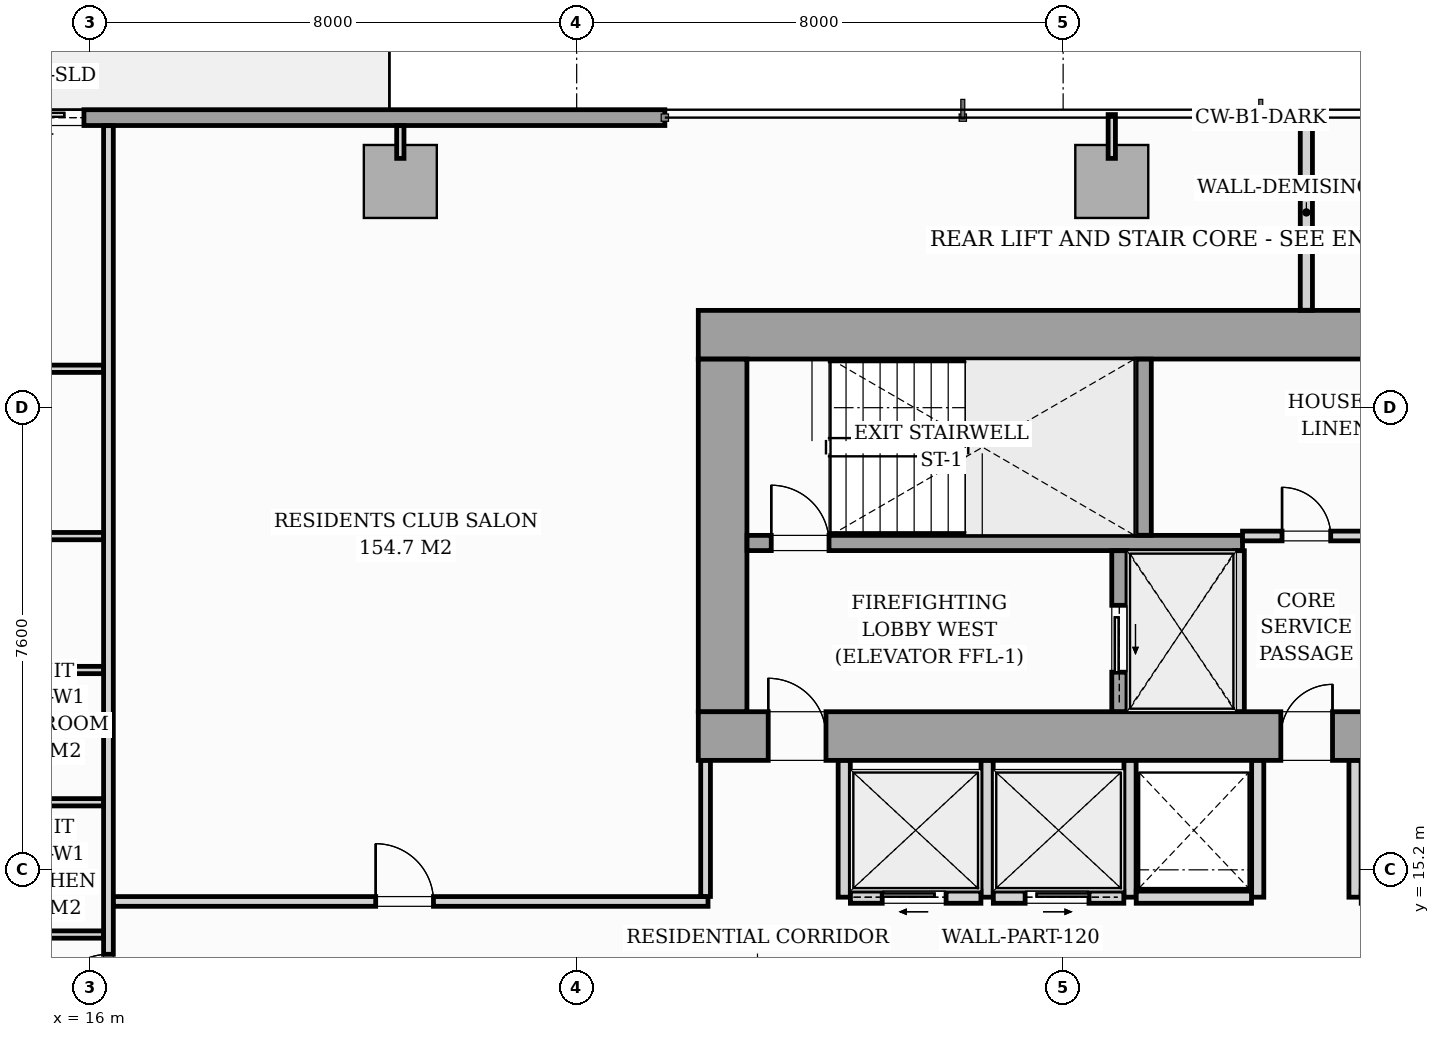
"""IFC4 building model, lengths in metres.
Left out: names, types, materials, properties, quantities, classifications, styles, units other than length and angle.
Written with IfcOpenShell. Run it as: python <this file> out.ifc"""

import sys

from ifc_helpers import new_model, si_unit, direction, frame, frame_2d, origin, origin_2d, place, context, subcontext, project, spatial, rectangle, i_section, extrude, source, transform, mapped, element, fill, save


model = new_model("IFC4")
c1 = context("Model", 3, precision=1e-05, world=origin(), true_north=direction((0.0, 1.0)))
c2 = subcontext(c1, "Body", "Model", "MODEL_VIEW")
j1 = project(units=[si_unit("LENGTHUNIT", "METRE"), si_unit("PLANEANGLEUNIT", "RADIAN")], contexts=[c1])
p1 = place(None, origin())
s1 = spatial("IfcSite", under=j1, at=p1, CompositionType="ELEMENT")
p2 = place(p1, origin())
s2 = spatial("IfcBuilding", under=s1, at=p2, CompositionType="ELEMENT")
p3 = place(p2, frame((0.0, 0.0, 51.8)))
s3 = spatial("IfcBuildingStorey", under=s2, at=p3, CompositionType="ELEMENT", Elevation=51.8)
m1 = source(origin(), c2, "Body", "SweptSolid", [
    extrude(i_section(OverallWidth=0.437, OverallDepth=0.514, WebThickness=0.061, FlangeThickness=0.097, FilletRadius=0.018, at=origin_2d()), origin(), (0.0, 0.0, 1.0), 3.196),
])
for number, where, z_axis, x_axis in (
    (1, (26.4, 17.4, 0.002), (0.0, 0.0, 1.0), (1.0, 0.0, 0.0)),
    (2, (33.12, 17.4, 0.002), (0.0, 0.0, 1.0), (1.0, 0.0, 0.0)),
    (3, (26.4, 24.0, 0.002), (0.0, 0.0, 1.0), (1.0, 0.0, 0.0)),
    (4, (33.12, 24.0, 0.002), (0.0, 0.0, 1.0), (1.0, 0.0, 0.0)),
):
    element("IfcColumn", number, at=place(p3, frame(where, z_axis=z_axis, x_axis=x_axis)), inside=s3, PredefinedType="PILASTER", context=c2, shape_type="MappedRepresentation", body=[
        mapped(m1, transform((0.0, 0.0, 0.0), scale=1.0)),
    ])
m2 = source(origin(), c2, "Body", "SweptSolid", [
    extrude(rectangle(XDim=1.2, YDim=1.2, at=origin_2d()), origin(), (0.0, 0.0, 1.0), 3.196),
])
for number, where, z_axis, x_axis in (
    (5, (21.1, 26.52, 0.002), (0.0, 0.0, 1.0), (1.0, 0.0, 0.0)),
    (6, (32.8, 26.52, 0.002), (0.0, 0.0, 1.0), (1.0, 0.0, 0.0)),
):
    element("IfcColumn", number, at=place(p3, frame(where, z_axis=z_axis, x_axis=x_axis)), inside=s3, PredefinedType="COLUMN", context=c2, shape_type="MappedRepresentation", body=[
        mapped(m2, transform((0.0, 0.0, 0.0), scale=1.0)),
    ])
p4 = place(p3, frame((8.3, 27.57, 0.0), z_axis=(0.0, 0.0, 1.0), x_axis=(1.0, 0.0, 0.0)))
e7 = element("IfcWall", 7, at=p4, inside=s3, PredefinedType="STANDARD", context=c2, shape_type="SweptSolid", body=[
    extrude(rectangle(XDim=17.15, YDim=0.26, at=frame_2d((8.575, 0.0))), origin(), (0.0, 0.0, 1.0), 2.94),
])
p5 = place(p4, frame((5.797, 0.0, 0.0)))
e8 = element("IfcOpeningElement", 8, at=p5, cuts=e7, PredefinedType="OPENING", context=c2, shape_type="SweptSolid", body=[
    extrude(rectangle(XDim=1.8, YDim=2.06, at=frame_2d((0.9, 1.03))), frame((0.0, 0.14, 0.0), z_axis=(0.0, -1.0, 0.0), x_axis=(1.0, 0.0, 0.0)), (0.0, 0.0, 1.0), 0.28),
])
p6 = place(p4, frame((2.05, 0.0, 0.65)))
e9 = element("IfcOpeningElement", 9, at=p6, cuts=e7, PredefinedType="OPENING", context=c2, shape_type="SweptSolid", body=[
    extrude(rectangle(XDim=1.6, YDim=1.5, at=frame_2d((0.8, 0.75))), frame((0.0, 0.14, 0.0), z_axis=(0.0, -1.0, 0.0), x_axis=(1.0, 0.0, 0.0)), (0.0, 0.0, 1.0), 0.28),
])
p7 = place(p3, frame((26.0, 17.4, 0.0), z_axis=(0.0, 0.0, 1.0), x_axis=(1.0, 0.0, 0.0)))
e10 = element("IfcWall", 10, at=p7, inside=s3, PredefinedType="SHEAR", context=c2, shape_type="SweptSolid", body=[
    extrude(rectangle(XDim=20.0, YDim=0.8, at=frame_2d((10.0, 0.0))), origin(), (0.0, 0.0, 1.0), 3.2),
])
p8 = place(p7, frame((1.15, 0.0, 0.0)))
e11 = element("IfcOpeningElement", 11, at=p8, cuts=e10, PredefinedType="OPENING", context=c2, shape_type="SweptSolid", body=[
    extrude(rectangle(XDim=0.95, YDim=2.06, at=frame_2d((0.475, 1.03))), frame((0.0, 0.41, 0.0), z_axis=(0.0, -1.0, 0.0), x_axis=(1.0, 0.0, 0.0)), (0.0, 0.0, 1.0), 0.82),
])
p9 = place(p7, frame((9.58, 0.0, 0.0)))
e12 = element("IfcOpeningElement", 12, at=p9, cuts=e10, PredefinedType="OPENING", context=c2, shape_type="SweptSolid", body=[
    extrude(rectangle(XDim=0.85, YDim=2.0, at=frame_2d((0.425, 1.0))), frame((0.0, 0.41, 0.0), z_axis=(0.0, -1.0, 0.0), x_axis=(1.0, 0.0, 0.0)), (0.0, 0.0, 1.0), 0.82),
])
p10 = place(p7, frame((17.75, 0.0, 0.0)))
e13 = element("IfcOpeningElement", 13, at=p10, cuts=e10, PredefinedType="OPENING", context=c2, shape_type="SweptSolid", body=[
    extrude(rectangle(XDim=0.95, YDim=2.06, at=frame_2d((0.475, 1.03))), frame((0.0, 0.41, 0.0), z_axis=(0.0, -1.0, 0.0), x_axis=(1.0, 0.0, 0.0)), (0.0, 0.0, 1.0), 0.82),
])
p11 = place(p3, frame((26.0, 24.0, 0.0), z_axis=(0.0, 0.0, 1.0), x_axis=(1.0, 0.0, 0.0)))
e14 = element("IfcWall", 14, at=p11, inside=s3, PredefinedType="SHEAR", context=c2, shape_type="SweptSolid", body=[
    extrude(rectangle(XDim=20.0, YDim=0.8, at=frame_2d((10.0, 0.0))), origin(), (0.0, 0.0, 1.0), 3.2),
])
p12 = place(p3, frame((26.4, 17.802, 0.0), z_axis=(0.0, 0.0, 1.0), x_axis=(0.0, 1.0, 0.0)))
e15 = element("IfcWall", 15, at=p12, inside=s3, PredefinedType="SHEAR", context=c2, shape_type="SweptSolid", body=[
    extrude(rectangle(XDim=5.796, YDim=0.8, at=frame_2d((2.898, 0.0))), origin(), (0.0, 0.0, 1.0), 3.2),
])
p13 = place(p3, frame((26.802, 20.575, 0.0), z_axis=(0.0, 0.0, 1.0), x_axis=(1.0, 0.0, 0.0)))
e16 = element("IfcWall", 16, at=p13, inside=s3, PredefinedType="SOLIDWALL", context=c2, shape_type="SweptSolid", body=[
    extrude(rectangle(XDim=8.148, YDim=0.25, at=frame_2d((4.074, 0.0))), origin(), (0.0, 0.0, 1.0), 3.2),
])
p14 = place(p13, frame((0.398, 0.0, 0.0)))
e17 = element("IfcOpeningElement", 17, at=p14, cuts=e16, PredefinedType="OPENING", context=c2, shape_type="SweptSolid", body=[
    extrude(rectangle(XDim=0.95, YDim=2.06, at=frame_2d((0.475, 1.03))), frame((0.0, 0.135, 0.0), z_axis=(0.0, -1.0, 0.0), x_axis=(1.0, 0.0, 0.0)), (0.0, 0.0, 1.0), 0.27),
])
p15 = place(p3, frame((33.325, 20.702, 0.0), z_axis=(0.0, 0.0, 1.0), x_axis=(0.0, 1.0, 0.0)))
e18 = element("IfcWall", 18, at=p15, inside=s3, PredefinedType="SOLIDWALL", context=c2, shape_type="SweptSolid", body=[
    extrude(rectangle(XDim=2.896, YDim=0.25, at=frame_2d((1.448, 0.0))), origin(), (0.0, 0.0, 1.0), 3.2),
])
p16 = place(p3, frame((32.925, 17.802, 0.0), z_axis=(0.0, 0.0, 1.0), x_axis=(0.0, 1.0, 0.0)))
e19 = element("IfcWall", 19, at=p16, inside=s3, PredefinedType="SOLIDWALL", context=c2, shape_type="SweptSolid", body=[
    extrude(rectangle(XDim=2.646, YDim=0.25, at=frame_2d((1.323, 0.0))), origin(), (0.0, 0.0, 1.0), 3.2),
])
p17 = place(p16, frame((0.648, 0.0, 0.0)))
e20 = element("IfcOpeningElement", 20, at=p17, cuts=e19, PredefinedType="OPENING", context=c2, shape_type="SweptSolid", body=[
    extrude(rectangle(XDim=1.1, YDim=2.08, at=frame_2d((0.55, 1.04))), frame((0.0, 0.135, 0.0), z_axis=(0.0, -1.0, 0.0), x_axis=(1.0, 0.0, 0.0)), (0.0, 0.0, 1.0), 0.27),
])
p18 = place(p3, frame((34.9, 17.802, 0.0), z_axis=(0.0, 0.0, 1.0), x_axis=(0.0, 1.0, 0.0)))
e21 = element("IfcWall", 21, at=p18, inside=s3, PredefinedType="PARTITIONING", context=c2, shape_type="SweptSolid", body=[
    extrude(rectangle(XDim=2.646, YDim=0.16, at=frame_2d((1.323, 0.0))), origin(), (0.0, 0.0, 1.0), 2.94),
])
p19 = place(p3, frame((34.95, 20.69, 0.0), z_axis=(0.0, 0.0, 1.0), x_axis=(1.0, 0.0, 0.0)))
e22 = element("IfcWall", 22, at=p19, inside=s3, PredefinedType="PARTITIONING", context=c2, shape_type="SweptSolid", body=[
    extrude(rectangle(XDim=2.1, YDim=0.16, at=frame_2d((1.05, 0.0))), origin(), (0.0, 0.0, 1.0), 2.94),
])
p20 = place(p19, frame((0.65, 0.0, 0.0)))
e23 = element("IfcOpeningElement", 23, at=p20, cuts=e22, PredefinedType="OPENING", context=c2, shape_type="SweptSolid", body=[
    extrude(rectangle(XDim=0.8, YDim=2.05, at=frame_2d((0.4, 1.025))), frame((0.0, 0.09, 0.0), z_axis=(0.0, -1.0, 0.0), x_axis=(1.0, 0.0, 0.0)), (0.0, 0.0, 1.0), 0.18),
])
for number, where, z_axis, x_axis in (
    (24, (28.4, 14.75, 0.0), (0.0, 0.0, 1.0), (0.0, 1.0, 0.0)),
    (25, (30.75, 14.75, 0.0), (0.0, 0.0, 1.0), (0.0, 1.0, 0.0)),
    (26, (33.1, 14.75, 0.0), (0.0, 0.0, 1.0), (0.0, 1.0, 0.0)),
):
    element("IfcWall", number, at=place(p3, frame(where, z_axis=z_axis, x_axis=x_axis)), inside=s3, PredefinedType="PARTITIONING", context=c2, shape_type="SweptSolid", body=[
        extrude(rectangle(XDim=2.248, YDim=0.2, at=frame_2d((1.124, 0.0))), origin(), (0.0, 0.0, 1.0), 2.94),
    ])
p21 = place(p3, frame((28.502, 14.75, 0.0), z_axis=(0.0, 0.0, 1.0), x_axis=(1.0, 0.0, 0.0)))
e27 = element("IfcWall", 27, at=p21, inside=s3, PredefinedType="PARTITIONING", context=c2, shape_type="SweptSolid", body=[
    extrude(rectangle(XDim=2.146, YDim=0.2, at=frame_2d((1.073, 0.0))), origin(), (0.0, 0.0, 1.0), 2.94),
])
p22 = place(p21, frame((0.523, 0.0, 0.0)))
e28 = element("IfcOpeningElement", 28, at=p22, cuts=e27, PredefinedType="OPENING", context=c2, shape_type="SweptSolid", body=[
    extrude(rectangle(XDim=1.05, YDim=2.08, at=frame_2d((0.525, 1.04))), frame((0.0, 0.11, 0.0), z_axis=(0.0, -1.0, 0.0), x_axis=(1.0, 0.0, 0.0)), (0.0, 0.0, 1.0), 0.22),
])
p23 = place(p3, frame((30.852, 14.75, 0.0), z_axis=(0.0, 0.0, 1.0), x_axis=(1.0, 0.0, 0.0)))
e29 = element("IfcWall", 29, at=p23, inside=s3, PredefinedType="PARTITIONING", context=c2, shape_type="SweptSolid", body=[
    extrude(rectangle(XDim=2.146, YDim=0.2, at=frame_2d((1.073, 0.0))), origin(), (0.0, 0.0, 1.0), 2.94),
])
p24 = place(p23, frame((0.523, 0.0, 0.0)))
e30 = element("IfcOpeningElement", 30, at=p24, cuts=e29, PredefinedType="OPENING", context=c2, shape_type="SweptSolid", body=[
    extrude(rectangle(XDim=1.05, YDim=2.08, at=frame_2d((0.525, 1.04))), frame((0.0, 0.11, 0.0), z_axis=(0.0, -1.0, 0.0), x_axis=(1.0, 0.0, 0.0)), (0.0, 0.0, 1.0), 0.22),
])
p25 = place(p3, frame((35.2, 14.75, 0.0), z_axis=(0.0, 0.0, 1.0), x_axis=(0.0, 1.0, 0.0)))
e31 = element("IfcWall", 31, at=p25, inside=s3, PredefinedType="PARTITIONING", context=c2, shape_type="SweptSolid", body=[
    extrude(rectangle(XDim=2.248, YDim=0.2, at=frame_2d((1.124, 0.0))), origin(), (0.0, 0.0, 1.0), 2.94),
])
p26 = place(p3, frame((33.202, 14.75, 0.0), z_axis=(0.0, 0.0, 1.0), x_axis=(1.0, 0.0, 0.0)))
e32 = element("IfcWall", 32, at=p26, inside=s3, PredefinedType="PARTITIONING", context=c2, shape_type="SweptSolid", body=[
    extrude(rectangle(XDim=1.896, YDim=0.2, at=frame_2d((0.948, 0.0))), origin(), (0.0, 0.0, 1.0), 2.94),
])
p27 = place(p3, frame((36.8, 14.75, 0.0), z_axis=(0.0, 0.0, 1.0), x_axis=(0.0, 1.0, 0.0)))
e33 = element("IfcWall", 33, at=p27, inside=s3, PredefinedType="PARTITIONING", context=c2, shape_type="SweptSolid", body=[
    extrude(rectangle(XDim=2.248, YDim=0.2, at=frame_2d((1.124, 0.0))), origin(), (0.0, 0.0, 1.0), 2.94),
])
p28 = place(p3, frame((16.3, 12.432, 0.0), z_axis=(0.0, 0.0, 1.0), x_axis=(0.0, 1.0, 0.0)))
e34 = element("IfcWall", 34, at=p28, inside=s3, PredefinedType="PARTITIONING", context=c2, shape_type="SweptSolid", body=[
    extrude(rectangle(XDim=15.006, YDim=0.16, at=frame_2d((7.503, 0.0))), origin(), (0.0, 0.0, 1.0), 2.94),
])
p29 = place(p28, frame((0.429, 0.0, 0.0)))
e35 = element("IfcOpeningElement", 35, at=p29, cuts=e34, PredefinedType="OPENING", context=c2, shape_type="SweptSolid", body=[
    extrude(rectangle(XDim=0.95, YDim=2.06, at=frame_2d((0.475, 1.03))), frame((0.0, 0.09, 0.0), z_axis=(0.0, -1.0, 0.0), x_axis=(1.0, 0.0, 0.0)), (0.0, 0.0, 1.0), 0.18),
])
p30 = place(p3, frame((36.0, 24.402, 0.0), z_axis=(0.0, 0.0, 1.0), x_axis=(0.0, 1.0, 0.0)))
e36 = element("IfcWall", 36, at=p30, inside=s3, PredefinedType="PARTITIONING", context=c2, shape_type="SweptSolid", body=[
    extrude(rectangle(XDim=3.218, YDim=0.2, at=frame_2d((1.609, 0.0))), origin(), (0.0, 0.0, 1.0), 2.94),
])
p31 = place(p3, frame((13.962, 16.311, 0.0), z_axis=(0.0, 0.0, 1.0), x_axis=(1.0, 0.0, 0.0)))
e37 = element("IfcWall", 37, at=p31, inside=s3, PredefinedType="PARTITIONING", context=c2, shape_type="SweptSolid", body=[
    extrude(rectangle(XDim=2.256, YDim=0.12, at=frame_2d((1.128, 0.0))), origin(), (0.0, 0.0, 1.0), 2.045),
])
for number, where, z_axis, x_axis in (
    (38, (13.962, 14.136, 0.0), (0.0, 0.0, 1.0), (1.0, 0.0, 0.0)),
    (39, (13.962, 18.486, 0.0), (0.0, 0.0, 1.0), (1.0, 0.0, 0.0)),
):
    element("IfcWall", number, at=place(p3, frame(where, z_axis=z_axis, x_axis=x_axis)), inside=s3, PredefinedType="PARTITIONING", context=c2, shape_type="SweptSolid", body=[
        extrude(rectangle(XDim=2.256, YDim=0.12, at=frame_2d((1.128, 0.0))), origin(), (0.0, 0.0, 1.0), 2.94),
    ])
p32 = place(p3, frame((5.88, 23.44, 0.0), z_axis=(0.0, 0.0, 1.0), x_axis=(1.0, 0.0, 0.0)))
e40 = element("IfcWall", 40, at=p32, inside=s3, PredefinedType="PARTITIONING", context=c2, shape_type="SweptSolid", body=[
    extrude(rectangle(XDim=10.338, YDim=0.12, at=frame_2d((5.169, 0.0))), origin(), (0.0, 0.0, 1.0), 2.94),
])
p33 = place(p32, frame((4.735, 0.0, 0.0)))
e41 = element("IfcOpeningElement", 41, at=p33, cuts=e40, PredefinedType="OPENING", context=c2, shape_type="SweptSolid", body=[
    extrude(rectangle(XDim=0.85, YDim=2.05, at=frame_2d((0.425, 1.025))), frame((0.0, 0.07, 0.0), z_axis=(0.0, -1.0, 0.0), x_axis=(1.0, 0.0, 0.0)), (0.0, 0.0, 1.0), 0.14),
])
p34 = place(p3, frame((5.88, 20.688, 0.0), z_axis=(0.0, 0.0, 1.0), x_axis=(1.0, 0.0, 0.0)))
e42 = element("IfcWall", 42, at=p34, inside=s3, PredefinedType="PARTITIONING", context=c2, shape_type="SweptSolid", body=[
    extrude(rectangle(XDim=10.338, YDim=0.12, at=frame_2d((5.169, 0.0))), origin(), (0.0, 0.0, 1.0), 2.94),
])
p35 = place(p34, frame((4.735, 0.0, 0.0)))
e43 = element("IfcOpeningElement", 43, at=p35, cuts=e42, PredefinedType="OPENING", context=c2, shape_type="SweptSolid", body=[
    extrude(rectangle(XDim=0.85, YDim=2.05, at=frame_2d((0.425, 1.025))), frame((0.0, 0.07, 0.0), z_axis=(0.0, -1.0, 0.0), x_axis=(1.0, 0.0, 0.0)), (0.0, 0.0, 1.0), 0.14),
])
p36 = place(p3, frame((16.382, 14.68, 0.0), z_axis=(0.0, 0.0, 1.0), x_axis=(1.0, 0.0, 0.0)))
e44 = element("IfcWall", 44, at=p36, inside=s3, PredefinedType="PARTITIONING", context=c2, shape_type="SweptSolid", body=[
    extrude(rectangle(XDim=9.778, YDim=0.16, at=frame_2d((4.889, 0.0))), origin(), (0.0, 0.0, 1.0), 2.94),
])
p37 = place(p36, frame((4.313, 0.0, 0.0)))
e45 = element("IfcOpeningElement", 45, at=p37, cuts=e44, PredefinedType="OPENING", context=c2, shape_type="SweptSolid", body=[
    extrude(rectangle(XDim=0.95, YDim=2.06, at=frame_2d((0.475, 1.03))), frame((0.0, 0.09, 0.0), z_axis=(0.0, -1.0, 0.0), x_axis=(1.0, 0.0, 0.0)), (0.0, 0.0, 1.0), 0.18),
])
p38 = place(p3, frame((26.12, 14.762, 0.0), z_axis=(0.0, 0.0, 1.0), x_axis=(0.0, 1.0, 0.0)))
e46 = element("IfcWall", 46, at=p38, inside=s3, PredefinedType="PARTITIONING", context=c2, shape_type="SweptSolid", body=[
    extrude(rectangle(XDim=2.236, YDim=0.16, at=frame_2d((1.118, 0.0))), origin(), (0.0, 0.0, 1.0), 2.94),
])
p39 = place(p3, frame((21.1, 26.9, 0.0), z_axis=(0.0, 0.0, 1.0), x_axis=(0.0, 1.0, 0.0)))
e47 = element("IfcWall", 47, at=p39, inside=s3, PredefinedType="PARTITIONING", context=c2, shape_type="SweptSolid", body=[
    extrude(rectangle(XDim=0.538, YDim=0.12, at=frame_2d((0.269, 0.0))), origin(), (0.0, 0.0, 1.0), 2.94),
])
p40 = place(p3, frame((32.8, 26.9, 0.0), z_axis=(0.0, 0.0, 1.0), x_axis=(0.0, 1.0, 0.0)))
e48 = element("IfcWall", 48, at=p40, inside=s3, PredefinedType="PARTITIONING", context=c2, shape_type="SweptSolid", body=[
    extrude(rectangle(XDim=0.72, YDim=0.12, at=frame_2d((0.36, 0.0))), origin(), (0.0, 0.0, 1.0), 2.94),
])
m3 = source(origin(), c2, "Body", "SweptSolid", [
    extrude(rectangle(XDim=1.8, YDim=2.06, at=frame_2d((0.9, 1.03))), frame((0.0, 0.025, 0.0), z_axis=(0.0, -1.0, 0.0), x_axis=(1.0, 0.0, 0.0)), (0.0, 0.0, 1.0), 0.05),
])
p41 = place(p5, origin())
e49 = element("IfcDoor", 49, at=p41, inside=s3, OperationType="SLIDING_TO_LEFT", PredefinedType="DOOR", context=c2, shape_type="MappedRepresentation", body=[
    mapped(m3, transform((0.0, 0.0, 0.0), scale=1.0)),
])
fill(e8, e49)
m4 = source(origin(), c2, "Body", "SweptSolid", [
    extrude(rectangle(XDim=0.95, YDim=2.06, at=frame_2d((0.475, 1.03))), frame((0.0, 0.025, 0.0), z_axis=(0.0, -1.0, 0.0), x_axis=(1.0, 0.0, 0.0)), (0.0, 0.0, 1.0), 0.05),
])
p42 = place(p8, origin())
e50 = element("IfcDoor", 50, at=p42, inside=s3, OperationType="SINGLE_SWING_LEFT", PredefinedType="DOOR", context=c2, shape_type="MappedRepresentation", body=[
    mapped(m4, transform((0.0, 0.0, 0.0), scale=1.0)),
])
fill(e11, e50)
m5 = source(origin(), c2, "Body", "SweptSolid", [
    extrude(rectangle(XDim=0.85, YDim=2.0, at=frame_2d((0.425, 1.0))), frame((0.0, 0.025, 0.0), z_axis=(0.0, -1.0, 0.0), x_axis=(1.0, 0.0, 0.0)), (0.0, 0.0, 1.0), 0.05),
])
p43 = place(p9, origin())
e51 = element("IfcDoor", 51, at=p43, inside=s3, OperationType="SINGLE_SWING_RIGHT", PredefinedType="DOOR", context=c2, shape_type="MappedRepresentation", body=[
    mapped(m5, transform((0.0, 0.0, 0.0), scale=1.0)),
])
fill(e12, e51)
p44 = place(p14, origin())
e52 = element("IfcDoor", 52, at=p44, inside=s3, OperationType="SINGLE_SWING_LEFT", PredefinedType="DOOR", context=c2, shape_type="MappedRepresentation", body=[
    mapped(m4, transform((0.0, 0.0, 0.0), scale=1.0)),
])
fill(e17, e52)
m6 = source(origin(), c2, "Body", "SweptSolid", [
    extrude(rectangle(XDim=1.1, YDim=2.08, at=frame_2d((0.55, 1.04))), frame((0.0, 0.025, 0.0), z_axis=(0.0, -1.0, 0.0), x_axis=(1.0, 0.0, 0.0)), (0.0, 0.0, 1.0), 0.05),
])
p45 = place(p17, origin())
e53 = element("IfcDoor", 53, at=p45, inside=s3, OperationType="SLIDING_TO_LEFT", PredefinedType="DOOR", context=c2, shape_type="MappedRepresentation", body=[
    mapped(m6, transform((0.0, 0.0, 0.0), scale=1.0)),
])
fill(e20, e53)
m7 = source(origin(), c2, "Body", "SweptSolid", [
    extrude(rectangle(XDim=0.8, YDim=2.05, at=frame_2d((0.4, 1.025))), frame((0.0, 0.025, 0.0), z_axis=(0.0, -1.0, 0.0), x_axis=(1.0, 0.0, 0.0)), (0.0, 0.0, 1.0), 0.05),
])
p46 = place(p20, origin())
e54 = element("IfcDoor", 54, at=p46, inside=s3, OperationType="SINGLE_SWING_LEFT", PredefinedType="DOOR", context=c2, shape_type="MappedRepresentation", body=[
    mapped(m7, transform((0.0, 0.0, 0.0), scale=1.0)),
])
fill(e23, e54)
m8 = source(origin(), c2, "Body", "SweptSolid", [
    extrude(rectangle(XDim=1.05, YDim=2.08, at=frame_2d((0.525, 1.04))), frame((0.0, 0.025, 0.0), z_axis=(0.0, -1.0, 0.0), x_axis=(1.0, 0.0, 0.0)), (0.0, 0.0, 1.0), 0.05),
])
p47 = place(p22, origin())
e55 = element("IfcDoor", 55, at=p47, inside=s3, OperationType="SLIDING_TO_LEFT", PredefinedType="DOOR", context=c2, shape_type="MappedRepresentation", body=[
    mapped(m8, transform((0.0, 0.0, 0.0), scale=1.0)),
])
fill(e28, e55)
p48 = place(p24, origin())
e56 = element("IfcDoor", 56, at=p48, inside=s3, OperationType="SLIDING_TO_RIGHT", PredefinedType="DOOR", context=c2, shape_type="MappedRepresentation", body=[
    mapped(m8, transform((0.0, 0.0, 0.0), scale=1.0)),
])
fill(e30, e56)
m9 = source(origin(), c2, "Body", "SweptSolid", [
    extrude(rectangle(XDim=0.95, YDim=2.06, at=frame_2d((0.475, 1.03))), frame((0.0, 0.025, 0.0), z_axis=(0.0, -1.0, 0.0), x_axis=(1.0, 0.0, 0.0)), (0.0, 0.0, 1.0), 0.05),
])
p49 = place(p29, origin())
e57 = element("IfcDoor", 57, at=p49, inside=s3, OperationType="SINGLE_SWING_LEFT", PredefinedType="DOOR", context=c2, shape_type="MappedRepresentation", body=[
    mapped(m9, transform((0.0, 0.0, 0.0), scale=1.0)),
])
fill(e35, e57)
p50 = place(p37, origin())
e58 = element("IfcDoor", 58, at=p50, inside=s3, OperationType="SINGLE_SWING_LEFT", PredefinedType="DOOR", context=c2, shape_type="MappedRepresentation", body=[
    mapped(m9, transform((0.0, 0.0, 0.0), scale=1.0)),
])
fill(e45, e58)
save(model, sys.argv[1])
